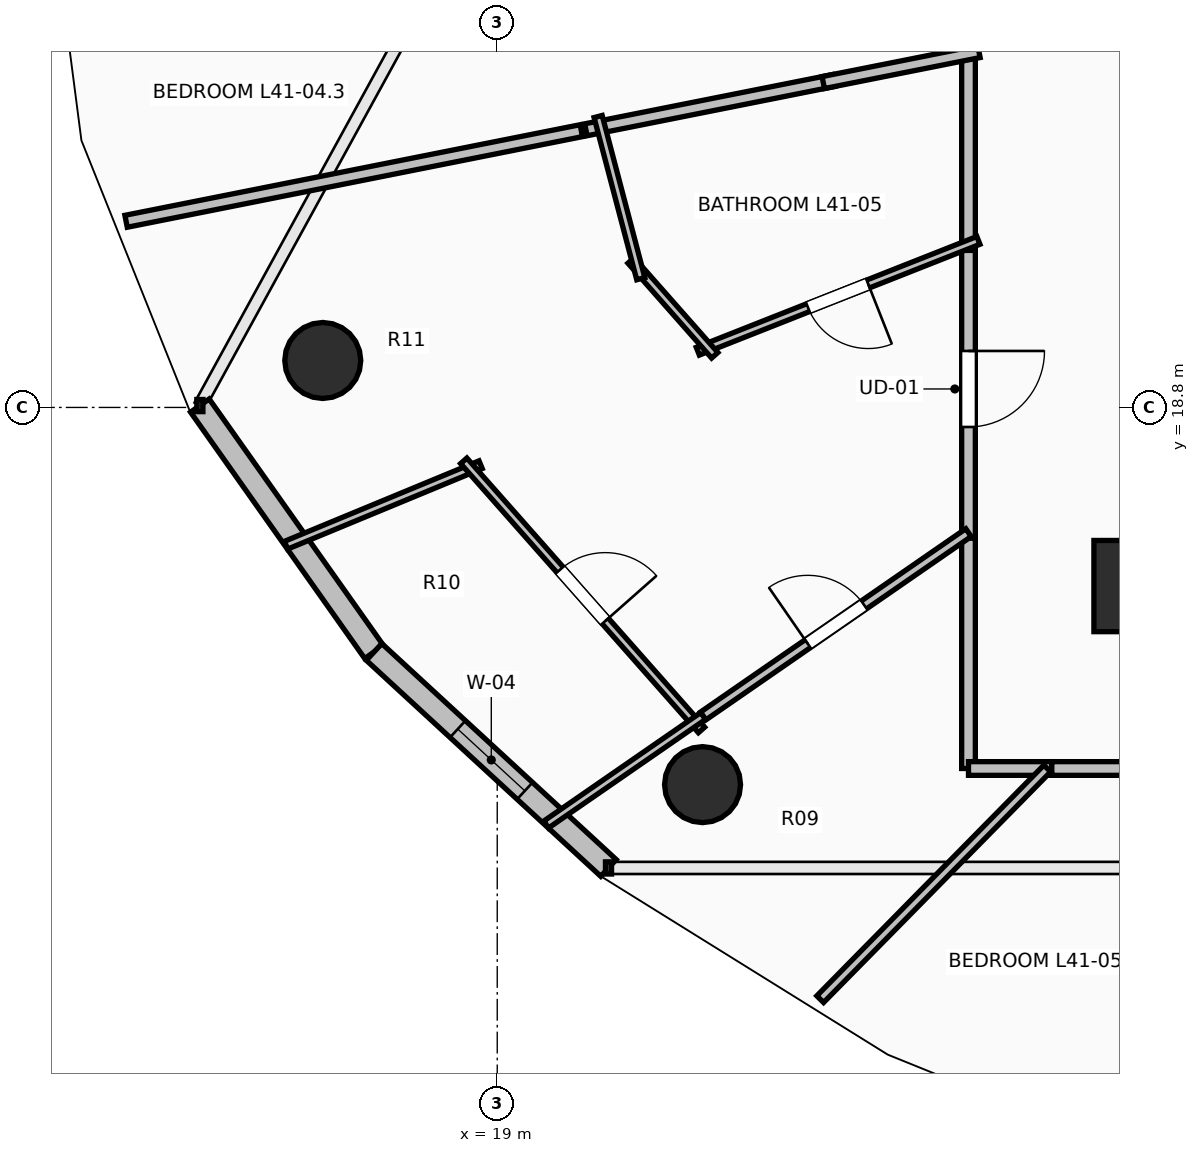
"""IFC4 building model, lengths in metres.
Left out: names, types, materials, properties, quantities, classifications, styles, units other than length and angle.
Written with IfcOpenShell. Run it as: python <this file> out.ifc"""

import sys

from ifc_helpers import new_model, si_unit, direction, frame, frame_2d, origin, origin_2d, place, context, subcontext, project, spatial, rectangle, circle, extrude, element, fill, save


model = new_model("IFC4")
c1 = context("Model", 3, precision=1e-05, world=origin(), true_north=direction((0.0, 1.0)))
c2 = subcontext(c1, "Body", "Model", "MODEL_VIEW")
j1 = project(units=[si_unit("LENGTHUNIT", "METRE"), si_unit("PLANEANGLEUNIT", "RADIAN")], contexts=[c1])
p1 = place(None, origin())
s1 = spatial("IfcSite", under=j1, at=p1, CompositionType="ELEMENT")
p2 = place(p1, origin())
s2 = spatial("IfcBuilding", under=s1, at=p2, CompositionType="ELEMENT")
p3 = place(p2, frame((0.0, 0.0, 153.6)))
s3 = spatial("IfcBuildingStorey", under=s2, at=p3, CompositionType="ELEMENT", Elevation=153.6)
for number, where, z_axis, x_axis in (
    (1, (16.705, 19.418, 0.0), (0.0, 0.0, 1.0), (-0.924, -0.383, 0.0)),
    (2, (21.701, 13.838, 0.0), (0.0, 0.0, 1.0), (-0.707, -0.707, 0.0)),
):
    element("IfcColumn", number, at=place(p3, frame(where, z_axis=z_axis, x_axis=x_axis)), inside=s3, PredefinedType="COLUMN", context=c2, shape_type="SweptSolid", body=[
        extrude(circle(Radius=0.5, at=origin_2d()), origin(), (0.0, 0.0, 1.0), 3.5),
    ])
p4 = place(p3, frame((27.25, 16.45, 0.0), z_axis=(0.0, 0.0, 1.0), x_axis=(1.0, 0.0, 0.0)))
e3 = element("IfcColumn", 3, at=p4, inside=s3, PredefinedType="PILASTER", context=c2, shape_type="SweptSolid", body=[
    extrude(rectangle(XDim=0.8, YDim=1.2, at=origin_2d()), origin(), (0.0, 0.0, 1.0), 3.5),
])
p5 = place(p3, frame((15.088, 18.825, 0.0), z_axis=(0.0, 0.0, 1.0), x_axis=(0.577269753207, -0.816553508371, 0.0)))
e4 = element("IfcWall", 4, at=p5, inside=s3, PredefinedType="STANDARD", context=c2, shape_type="SweptSolid", body=[
    extrude(rectangle(XDim=3.97, YDim=0.3, at=frame_2d((1.985, 0.0))), origin(), (0.0, 0.0, 1.0), 3.24),
])
p6 = place(p3, frame((17.38, 15.583, 0.0), z_axis=(0.0, 0.0, 1.0), x_axis=(0.735477154165, -0.677549522693, 0.0)))
e5 = element("IfcWall", 5, at=p6, inside=s3, PredefinedType="STANDARD", context=c2, shape_type="SweptSolid", body=[
    extrude(rectangle(XDim=4.194, YDim=0.3, at=frame_2d((2.097, 0.0))), origin(), (0.0, 0.0, 1.0), 3.24),
])
p7 = place(p6, frame((1.497, 0.0, 0.85)))
e6 = element("IfcOpeningElement", 6, at=p7, cuts=e5, PredefinedType="OPENING", context=c2, shape_type="SweptSolid", body=[
    extrude(rectangle(XDim=1.2, YDim=2.1, at=frame_2d((0.6, 1.05))), frame((0.0, 0.165, 0.0), z_axis=(0.0, -1.0, 0.0), x_axis=(1.0, 0.0, 0.0)), (0.0, 0.0, 1.0), 0.33),
])
p8 = place(p3, frame((25.2, 24.55, 0.0), z_axis=(0.0, 0.0, 1.0), x_axis=(0.0, -1.0, 0.0)))
e7 = element("IfcWall", 7, at=p8, inside=s3, PredefinedType="PARTITIONING", context=c2, shape_type="SweptSolid", body=[
    extrude(rectangle(XDim=1.157, YDim=0.18, at=frame_2d((0.579, 0.0))), origin(), (0.0, 0.0, 1.0), 3.24),
])
p9 = place(p3, frame((25.2, 21.006, 0.0), z_axis=(0.0, 0.0, 1.0), x_axis=(0.0, -1.0, 0.0)))
e8 = element("IfcWall", 8, at=p9, inside=s3, PredefinedType="PARTITIONING", context=c2, shape_type="SweptSolid", body=[
    extrude(rectangle(XDim=3.926, YDim=0.18, at=frame_2d((1.963, 0.0))), origin(), (0.0, 0.0, 1.0), 2.432),
])
p10 = place(p9, frame((1.463, 0.0, 0.0)))
e9 = element("IfcOpeningElement", 9, at=p10, cuts=e8, PredefinedType="OPENING", context=c2, shape_type="SweptSolid", body=[
    extrude(rectangle(XDim=1.0, YDim=2.15, at=frame_2d((0.5, 1.075))), frame((0.0, 0.105, 0.0), z_axis=(0.0, -1.0, 0.0), x_axis=(1.0, 0.0, 0.0)), (0.0, 0.0, 1.0), 0.21),
])
p11 = place(p3, frame((25.2, 23.533, 0.0), z_axis=(0.0, 0.0, 1.0), x_axis=(0.0, -1.0, 0.0)))
e10 = element("IfcWall", 10, at=p11, inside=s3, PredefinedType="PARTITIONING", context=c2, shape_type="SweptSolid", body=[
    extrude(rectangle(XDim=2.667, YDim=0.18, at=frame_2d((1.333, 0.0))), origin(), (0.0, 0.0, 1.0), 3.24),
])
p12 = place(p3, frame((25.2, 17.08, 0.0), z_axis=(0.0, 0.0, 1.0), x_axis=(0.0, -1.0, 0.0)))
e11 = element("IfcWall", 11, at=p12, inside=s3, PredefinedType="PARTITIONING", context=c2, shape_type="SweptSolid", body=[
    extrude(rectangle(XDim=3.03, YDim=0.18, at=frame_2d((1.515, 0.0))), origin(), (0.0, 0.0, 1.0), 2.432),
])
p13 = place(p3, frame((25.2, 14.05, 0.0), z_axis=(0.0, 0.0, 1.0), x_axis=(1.0, 0.0, 0.0)))
e12 = element("IfcWall", 12, at=p13, inside=s3, PredefinedType="PARTITIONING", context=c2, shape_type="SweptSolid", body=[
    extrude(rectangle(XDim=1.096, YDim=0.18, at=frame_2d((0.548, 0.0))), origin(), (0.0, 0.0, 1.0), 2.972),
])
p14 = place(p3, frame((26.296, 14.05, 0.0), z_axis=(0.0, 0.0, 1.0), x_axis=(1.0, 0.0, 0.0)))
e13 = element("IfcWall", 13, at=p14, inside=s3, PredefinedType="PARTITIONING", context=c2, shape_type="SweptSolid", body=[
    extrude(rectangle(XDim=3.779, YDim=0.18, at=frame_2d((1.89, 0.0))), origin(), (0.0, 0.0, 1.0), 2.432),
])
p15 = place(p14, frame((1.465, 0.0, 0.0)))
e14 = element("IfcOpeningElement", 14, at=p15, cuts=e13, PredefinedType="OPENING", context=c2, shape_type="SweptSolid", body=[
    extrude(rectangle(XDim=0.85, YDim=2.1, at=frame_2d((0.425, 1.05))), frame((0.0, 0.105, 0.0), z_axis=(0.0, -1.0, 0.0), x_axis=(1.0, 0.0, 0.0)), (0.0, 0.0, 1.0), 0.21),
])
p16 = place(p3, frame((14.117, 21.249, 0.0), z_axis=(0.0, 0.0, 1.0), x_axis=(0.980766298352, 0.19518572698, 0.0)))
e15 = element("IfcWall", 15, at=p16, inside=s3, PredefinedType="PARTITIONING", context=c2, shape_type="SweptSolid", body=[
    extrude(rectangle(XDim=6.106, YDim=0.16, at=frame_2d((3.053, 0.0))), origin(), (0.0, 0.0, 1.0), 2.728),
])
p17 = place(p3, frame((20.167, 22.453, 0.0), z_axis=(0.0, 0.0, 1.0), x_axis=(0.980766708229, 0.195183667423, 0.0)))
e16 = element("IfcWall", 16, at=p17, inside=s3, PredefinedType="PARTITIONING", context=c2, shape_type="SweptSolid", body=[
    extrude(rectangle(XDim=3.323, YDim=0.16, at=frame_2d((1.662, 0.0))), origin(), (0.0, 0.0, 1.0), 2.972),
])
p18 = place(p3, frame((23.289, 23.074, 0.0), z_axis=(0.0, 0.0, 1.0), x_axis=(0.980804842296, 0.194991951961, 0.0)))
e17 = element("IfcWall", 17, at=p18, inside=s3, PredefinedType="PARTITIONING", context=c2, shape_type="SweptSolid", body=[
    extrude(rectangle(XDim=2.088, YDim=0.16, at=frame_2d((1.044, 0.0))), origin(), (0.0, 0.0, 1.0), 2.886),
])
p19 = place(p3, frame((25.33, 20.997, 0.0), z_axis=(0.0, 0.0, 1.0), x_axis=(-0.930092731386, -0.367324803169, 0.0)))
e18 = element("IfcWall", 18, at=p19, inside=s3, PredefinedType="PARTITIONING", context=c2, shape_type="SweptSolid", body=[
    extrude(rectangle(XDim=3.969, YDim=0.11, at=frame_2d((1.984, 0.0))), origin(), (0.0, 0.0, 1.0), 2.886),
])
p20 = place(p19, frame((1.559, 0.0, 0.0)))
e19 = element("IfcOpeningElement", 19, at=p20, cuts=e18, PredefinedType="OPENING", context=c2, shape_type="SweptSolid", body=[
    extrude(rectangle(XDim=0.85, YDim=2.1, at=frame_2d((0.425, 1.05))), frame((0.0, 0.07, 0.0), z_axis=(0.0, -1.0, 0.0), x_axis=(1.0, 0.0, 0.0)), (0.0, 0.0, 1.0), 0.14),
])
p21 = place(p3, frame((21.862, 19.486, 0.0), z_axis=(0.0, 0.0, 1.0), x_axis=(-0.661645897528, 0.749816448396, 0.0)))
e20 = element("IfcWall", 20, at=p21, inside=s3, PredefinedType="PARTITIONING", context=c2, shape_type="SweptSolid", body=[
    extrude(rectangle(XDim=1.664, YDim=0.11, at=frame_2d((0.832, 0.0))), origin(), (0.0, 0.0, 1.0), 3.24),
])
p22 = place(p3, frame((20.889, 20.494, 0.0), z_axis=(0.0, 0.0, 1.0), x_axis=(-0.254389812051, 0.967101764823, 0.0)))
e21 = element("IfcWall", 21, at=p22, inside=s3, PredefinedType="PARTITIONING", context=c2, shape_type="SweptSolid", body=[
    extrude(rectangle(XDim=2.206, YDim=0.11, at=frame_2d((1.103, 0.0))), origin(), (0.0, 0.0, 1.0), 3.24),
])
p23 = place(p3, frame((16.222, 16.988, 0.0), z_axis=(0.0, 0.0, 1.0), x_axis=(0.924067287951, 0.382229835751, 0.0)))
e22 = element("IfcWall", 22, at=p23, inside=s3, PredefinedType="PARTITIONING", context=c2, shape_type="SweptSolid", body=[
    extrude(rectangle(XDim=2.77, YDim=0.11, at=frame_2d((1.385, 0.0))), origin(), (0.0, 0.0, 1.0), 2.728),
])
p24 = place(p3, frame((18.559, 18.098, 0.0), z_axis=(0.0, 0.0, 1.0), x_axis=(0.662122223318, -0.749395864272, 0.0)))
e23 = element("IfcWall", 23, at=p24, inside=s3, PredefinedType="PARTITIONING", context=c2, shape_type="SweptSolid", body=[
    extrude(rectangle(XDim=4.725, YDim=0.11, at=frame_2d((2.362, 0.0))), origin(), (0.0, 0.0, 1.0), 3.24),
])
p25 = place(p24, frame((1.912, 0.0, 0.0)))
e24 = element("IfcOpeningElement", 24, at=p25, cuts=e23, PredefinedType="OPENING", context=c2, shape_type="SweptSolid", body=[
    extrude(rectangle(XDim=0.9, YDim=2.1, at=frame_2d((0.45, 1.05))), frame((0.0, 0.07, 0.0), z_axis=(0.0, -1.0, 0.0), x_axis=(1.0, 0.0, 0.0)), (0.0, 0.0, 1.0), 0.14),
])
p26 = place(p3, frame((21.71, 14.742, 0.0), z_axis=(0.0, 0.0, 1.0), x_axis=(-0.822632807799, -0.568573006335, 0.0)))
e25 = element("IfcWall", 25, at=p26, inside=s3, PredefinedType="PARTITIONING", context=c2, shape_type="SweptSolid", body=[
    extrude(rectangle(XDim=2.512, YDim=0.11, at=frame_2d((1.256, 0.0))), origin(), (0.0, 0.0, 1.0), 2.728),
])
p27 = place(p3, frame((21.71, 14.741, 0.0), z_axis=(0.0, 0.0, 1.0), x_axis=(0.822672586971, 0.568515448027, 0.0)))
e26 = element("IfcWall", 26, at=p27, inside=s3, PredefinedType="PARTITIONING", context=c2, shape_type="SweptSolid", body=[
    extrude(rectangle(XDim=4.242, YDim=0.125, at=frame_2d((2.121, 0.0))), origin(), (0.0, 0.0, 1.0), 2.432),
])
p28 = place(p27, frame((1.671, 0.0, 0.0)))
e27 = element("IfcOpeningElement", 27, at=p28, cuts=e26, PredefinedType="OPENING", context=c2, shape_type="SweptSolid", body=[
    extrude(rectangle(XDim=0.9, YDim=2.1, at=frame_2d((0.45, 1.05))), frame((0.0, 0.077, 0.0), z_axis=(0.0, -1.0, 0.0), x_axis=(1.0, 0.0, 0.0)), (0.0, 0.0, 1.0), 0.155),
])
p29 = place(p3, frame((23.249, 11.015, 0.0), z_axis=(0.0, 0.0, 1.0), x_axis=(0.701437189486, 0.712731274188, 0.0)))
e28 = element("IfcWall", 28, at=p29, inside=s3, PredefinedType="PARTITIONING", context=c2, shape_type="SweptSolid", body=[
    extrude(rectangle(XDim=4.259, YDim=0.125, at=frame_2d((2.129, 0.0))), origin(), (0.0, 0.0, 1.0), 2.728),
])
p30 = place(p3, frame((26.869, 9.341, 0.0), z_axis=(0.0, 0.0, 1.0), x_axis=(0.555772359104, 0.831334520428, 0.0)))
e29 = element("IfcWall", 29, at=p30, inside=s3, PredefinedType="PARTITIONING", context=c2, shape_type="SweptSolid", body=[
    extrude(rectangle(XDim=1.103, YDim=0.16, at=frame_2d((0.552, 0.0))), origin(), (0.0, 0.0, 1.0), 3.24),
])
p31 = place(p7, origin())
e30 = element("IfcWindow", 30, at=p31, inside=s3, PartitioningType="SINGLE_PANEL", PredefinedType="WINDOW", context=c2, shape_type="SweptSolid", body=[
    extrude(rectangle(XDim=1.2, YDim=2.1, at=frame_2d((0.6, 1.05))), frame((0.0, 0.03, 0.0), z_axis=(0.0, -1.0, 0.0), x_axis=(1.0, 0.0, 0.0)), (0.0, 0.0, 1.0), 0.06),
])
fill(e6, e30)
p32 = place(p10, origin())
e31 = element("IfcDoor", 31, at=p32, inside=s3, OperationType="SINGLE_SWING_LEFT", PredefinedType="DOOR", context=c2, shape_type="SweptSolid", body=[
    extrude(rectangle(XDim=1.0, YDim=2.15, at=frame_2d((0.5, 1.075))), frame((0.0, 0.025, 0.0), z_axis=(0.0, -1.0, 0.0), x_axis=(1.0, 0.0, 0.0)), (0.0, 0.0, 1.0), 0.05),
])
fill(e9, e31)
p33 = place(p20, origin())
e32 = element("IfcDoor", 32, at=p33, inside=s3, OperationType="SINGLE_SWING_LEFT", PredefinedType="DOOR", context=c2, shape_type="SweptSolid", body=[
    extrude(rectangle(XDim=0.85, YDim=2.1, at=frame_2d((0.425, 1.05))), frame((0.0, 0.025, 0.0), z_axis=(0.0, -1.0, 0.0), x_axis=(1.0, 0.0, 0.0)), (0.0, 0.0, 1.0), 0.05),
])
fill(e19, e32)
p34 = place(p25, origin())
e33 = element("IfcDoor", 33, at=p34, inside=s3, OperationType="SINGLE_SWING_RIGHT", PredefinedType="DOOR", context=c2, shape_type="SweptSolid", body=[
    extrude(rectangle(XDim=0.9, YDim=2.1, at=frame_2d((0.45, 1.05))), frame((0.0, 0.025, 0.0), z_axis=(0.0, -1.0, 0.0), x_axis=(1.0, 0.0, 0.0)), (0.0, 0.0, 1.0), 0.05),
])
fill(e24, e33)
p35 = place(p28, origin())
e34 = element("IfcDoor", 34, at=p35, inside=s3, OperationType="SINGLE_SWING_LEFT", PredefinedType="DOOR", context=c2, shape_type="SweptSolid", body=[
    extrude(rectangle(XDim=0.9, YDim=2.1, at=frame_2d((0.45, 1.05))), frame((0.0, 0.025, 0.0), z_axis=(0.0, -1.0, 0.0), x_axis=(1.0, 0.0, 0.0)), (0.0, 0.0, 1.0), 0.05),
])
fill(e27, e34)
save(model, sys.argv[1])
